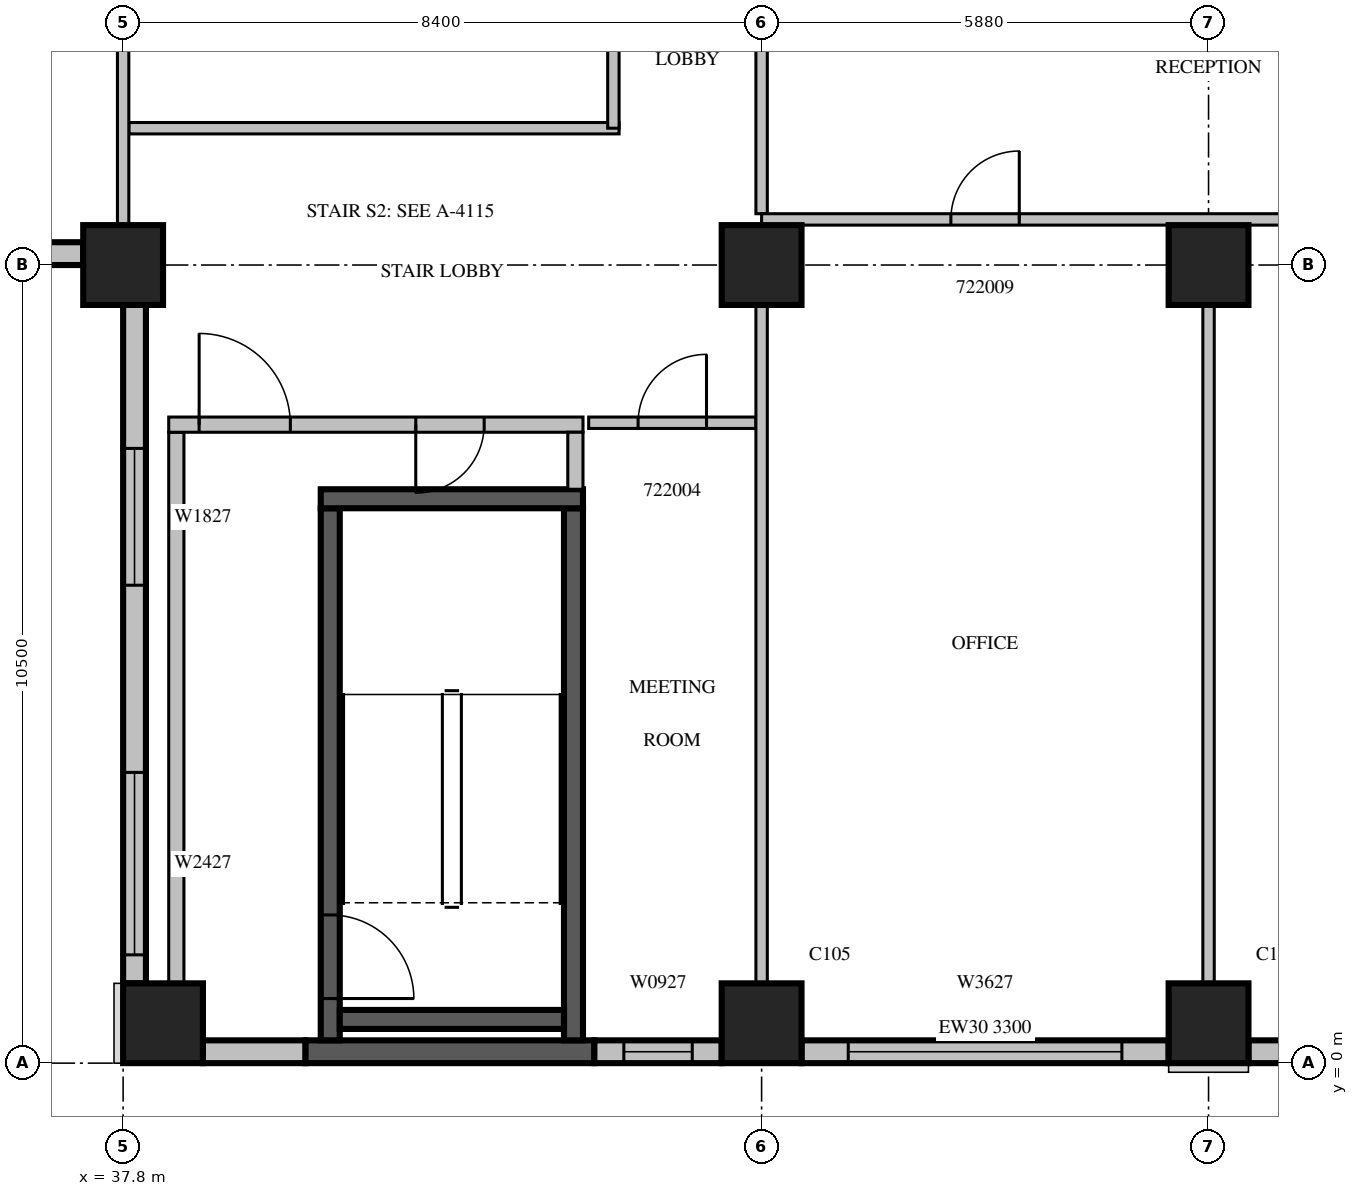
"""IFC4 building model, lengths in metres.
Left out: names, types, materials, properties, quantities, classifications, styles, units other than length and angle.
Written with IfcOpenShell. Run it as: python <this file> out.ifc"""

import sys

from ifc_helpers import new_model, si_unit, direction, frame, frame_2d, origin, origin_2d, place, context, subcontext, project, spatial, rectangle, extrude, source, transform, mapped, element, fill, save


model = new_model("IFC4")
c1 = context("Model", 3, precision=1e-05, world=origin(), true_north=direction((0.0, 1.0)))
c2 = subcontext(c1, "Body", "Model", "MODEL_VIEW")
j1 = project(units=[si_unit("LENGTHUNIT", "METRE"), si_unit("PLANEANGLEUNIT", "RADIAN")], contexts=[c1])
p1 = place(None, origin())
s1 = spatial("IfcSite", under=j1, at=p1, CompositionType="ELEMENT")
p2 = place(p1, origin())
s2 = spatial("IfcBuilding", under=s1, at=p2, CompositionType="ELEMENT")
p3 = place(p2, frame((0.0, 0.0, 103.5)))
s3 = spatial("IfcBuildingStorey", under=s2, at=p3, CompositionType="ELEMENT", Elevation=103.5)
m1 = source(origin(), c2, "Body", "SweptSolid", [
    extrude(rectangle(XDim=1.05, YDim=1.05, at=origin_2d()), origin(), (0.0, 0.0, 1.0), 4.2),
])
for number, where, z_axis, x_axis in (
    (1, (38.325, 0.525, 0.0), (0.0, 0.0, 1.0), (1.0, 0.0, 0.0)),
    (2, (46.2, 0.525, 0.0), (0.0, 0.0, 1.0), (1.0, 0.0, 0.0)),
    (3, (52.08, 0.525, 0.0), (0.0, 0.0, 1.0), (1.0, 0.0, 0.0)),
    (4, (37.8, 10.5, 0.0), (0.0, 0.0, 1.0), (1.0, 0.0, 0.0)),
    (5, (46.2, 10.5, 0.0), (0.0, 0.0, 1.0), (1.0, 0.0, 0.0)),
    (6, (52.08, 10.5, 0.0), (0.0, 0.0, 1.0), (1.0, 0.0, 0.0)),
):
    element("IfcColumn", number, at=place(p3, frame(where, z_axis=z_axis, x_axis=x_axis)), inside=s3, PredefinedType="COLUMN", context=c2, shape_type="MappedRepresentation", body=[
        mapped(m1, transform((0.0, 0.0, 0.0), scale=1.0)),
    ])
m2 = source(origin(), c2, "Body", "SweptSolid", [
    extrude(rectangle(XDim=7.35, YDim=0.3, at=frame_2d((3.675, 0.0))), origin(), (0.0, 0.0, 1.0), 3.8),
])
p4 = place(p3, frame((29.925, 10.65, 0.0), z_axis=(0.0, 0.0, 1.0), x_axis=(1.0, 0.0, 0.0)))
e7 = element("IfcWall", 7, at=p4, inside=s3, PredefinedType="STANDARD", context=c2, shape_type="MappedRepresentation", body=[
    mapped(m2, transform((0.0, 0.0, 0.0), scale=1.0)),
])
m3 = source(origin(), c2, "Body", "SweptSolid", [
    extrude(rectangle(XDim=1.8, YDim=2.7, at=frame_2d((0.9, 1.35))), frame((0.0, 0.16, 0.0), z_axis=(0.0, -1.0, 0.0), x_axis=(1.0, 0.0, 0.0)), (0.0, 0.0, 1.0), 0.32),
])
p5 = place(p4, frame((4.948, 0.0, 0.6)))
e8 = element("IfcOpeningElement", 8, at=p5, cuts=e7, PredefinedType="OPENING", context=c2, shape_type="MappedRepresentation", body=[
    mapped(m3, transform((0.0, 0.0, 0.0), scale=1.0)),
])
m4 = source(origin(), c2, "Body", "SweptSolid", [
    extrude(rectangle(XDim=1.2, YDim=2.7, at=frame_2d((0.6, 1.35))), frame((0.0, 0.16, 0.0), z_axis=(0.0, -1.0, 0.0), x_axis=(1.0, 0.0, 0.0)), (0.0, 0.0, 1.0), 0.32),
])
p6 = place(p4, frame((2.195, 0.0, 0.6)))
e9 = element("IfcOpeningElement", 9, at=p6, cuts=e7, PredefinedType="OPENING", context=c2, shape_type="MappedRepresentation", body=[
    mapped(m4, transform((0.0, 0.0, 0.0), scale=1.0)),
])
m5 = source(origin(), c2, "Body", "SweptSolid", [
    extrude(rectangle(XDim=8.925, YDim=0.3, at=frame_2d((4.463, 0.0))), origin(), (0.0, 0.0, 1.0), 3.8),
])
p7 = place(p3, frame((37.95, 9.975, 0.0), z_axis=(0.0, 0.0, 1.0), x_axis=(0.0, -1.0, 0.0)))
e10 = element("IfcWall", 10, at=p7, inside=s3, PredefinedType="STANDARD", context=c2, shape_type="MappedRepresentation", body=[
    mapped(m5, transform((0.0, 0.0, 0.0), scale=1.0)),
])
p8 = place(p7, frame((1.887, 0.0, 0.6)))
e11 = element("IfcOpeningElement", 11, at=p8, cuts=e10, PredefinedType="OPENING", context=c2, shape_type="MappedRepresentation", body=[
    mapped(m3, transform((0.0, 0.0, 0.0), scale=1.0)),
])
m6 = source(origin(), c2, "Body", "SweptSolid", [
    extrude(rectangle(XDim=2.4, YDim=2.7, at=frame_2d((1.2, 1.35))), frame((0.0, 0.16, 0.0), z_axis=(0.0, -1.0, 0.0), x_axis=(1.0, 0.0, 0.0)), (0.0, 0.0, 1.0), 0.32),
])
p9 = place(p7, frame((6.15, 0.0, 0.6)))
e12 = element("IfcOpeningElement", 12, at=p9, cuts=e10, PredefinedType="OPENING", context=c2, shape_type="MappedRepresentation", body=[
    mapped(m6, transform((0.0, 0.0, 0.0), scale=1.0)),
])
p10 = place(p3, frame((38.85, 0.15, 0.0), z_axis=(0.0, 0.0, 1.0), x_axis=(1.0, 0.0, 0.0)))
e13 = element("IfcWall", 13, at=p10, inside=s3, PredefinedType="STANDARD", context=c2, shape_type="SweptSolid", body=[
    extrude(rectangle(XDim=1.35, YDim=0.3, at=frame_2d((0.675, 0.0))), origin(), (0.0, 0.0, 1.0), 3.8),
])
m7 = source(origin(), c2, "Body", "SweptSolid", [
    extrude(rectangle(XDim=3.8, YDim=0.3, at=frame_2d((1.9, 0.0))), origin(), (0.0, 0.0, 1.0), 3.8),
])
p11 = place(p3, frame((40.2, 0.15, 0.0), z_axis=(0.0, 0.0, 1.0), x_axis=(1.0, 0.0, 0.0)))
e14 = element("IfcWall", 14, at=p11, inside=s3, PredefinedType="SOLIDWALL", context=c2, shape_type="MappedRepresentation", body=[
    mapped(m7, transform((0.0, 0.0, 0.0), scale=1.0)),
])
p12 = place(p3, frame((44.0, 0.15, 0.0), z_axis=(0.0, 0.0, 1.0), x_axis=(1.0, 0.0, 0.0)))
e15 = element("IfcWall", 15, at=p12, inside=s3, PredefinedType="STANDARD", context=c2, shape_type="SweptSolid", body=[
    extrude(rectangle(XDim=1.675, YDim=0.3, at=frame_2d((0.838, 0.0))), origin(), (0.0, 0.0, 1.0), 3.8),
])
m8 = source(origin(), c2, "Body", "SweptSolid", [
    extrude(rectangle(XDim=0.9, YDim=2.7, at=frame_2d((0.45, 1.35))), frame((0.0, 0.16, 0.0), z_axis=(0.0, -1.0, 0.0), x_axis=(1.0, 0.0, 0.0)), (0.0, 0.0, 1.0), 0.32),
])
p13 = place(p12, frame((0.388, 0.0, 0.6)))
e16 = element("IfcOpeningElement", 16, at=p13, cuts=e15, PredefinedType="OPENING", context=c2, shape_type="MappedRepresentation", body=[
    mapped(m8, transform((0.0, 0.0, 0.0), scale=1.0)),
])
p14 = place(p3, frame((46.725, 0.15, 0.0), z_axis=(0.0, 0.0, 1.0), x_axis=(1.0, 0.0, 0.0)))
e17 = element("IfcWall", 17, at=p14, inside=s3, PredefinedType="STANDARD", context=c2, shape_type="SweptSolid", body=[
    extrude(rectangle(XDim=4.83, YDim=0.3, at=frame_2d((2.415, 0.0))), origin(), (0.0, 0.0, 1.0), 3.3),
])
m9 = source(origin(), c2, "Body", "SweptSolid", [
    extrude(rectangle(XDim=3.6, YDim=2.7, at=frame_2d((1.8, 1.35))), frame((0.0, 0.16, 0.0), z_axis=(0.0, -1.0, 0.0), x_axis=(1.0, 0.0, 0.0)), (0.0, 0.0, 1.0), 0.32),
])
p15 = place(p14, frame((0.615, 0.0, 0.6)))
e18 = element("IfcOpeningElement", 18, at=p15, cuts=e17, PredefinedType="OPENING", context=c2, shape_type="MappedRepresentation", body=[
    mapped(m9, transform((0.0, 0.0, 0.0), scale=1.0)),
])
p16 = place(p3, frame((52.605, 0.15, 0.0), z_axis=(0.0, 0.0, 1.0), x_axis=(1.0, 0.0, 0.0)))
e19 = element("IfcWall", 19, at=p16, inside=s3, PredefinedType="STANDARD", context=c2, shape_type="SweptSolid", body=[
    extrude(rectangle(XDim=4.83, YDim=0.3, at=frame_2d((2.415, 0.0))), origin(), (0.0, 0.0, 1.0), 3.8),
])
p17 = place(p16, frame((0.615, 0.0, 0.6)))
e20 = element("IfcOpeningElement", 20, at=p17, cuts=e19, PredefinedType="OPENING", context=c2, shape_type="MappedRepresentation", body=[
    mapped(m9, transform((0.0, 0.0, 0.0), scale=1.0)),
])
m10 = source(origin(), c2, "Body", "SweptSolid", [
    extrude(rectangle(XDim=7.0, YDim=0.25, at=frame_2d((3.5, 0.0))), origin(), (0.0, 0.0, 1.0), 3.8),
])
p18 = place(p3, frame((40.525, 0.3, 0.0), z_axis=(0.0, 0.0, 1.0), x_axis=(0.0, 1.0, 0.0)))
e21 = element("IfcWall", 21, at=p18, inside=s3, PredefinedType="SOLIDWALL", context=c2, shape_type="MappedRepresentation", body=[
    mapped(m10, transform((0.0, 0.0, 0.0), scale=1.0)),
])
m11 = source(origin(), c2, "Body", "SweptSolid", [
    extrude(rectangle(XDim=1.1, YDim=2.1, at=frame_2d((0.55, 1.05))), frame((0.0, 0.135, 0.0), z_axis=(0.0, -1.0, 0.0), x_axis=(1.0, 0.0, 0.0)), (0.0, 0.0, 1.0), 0.27),
])
p19 = place(p18, frame((0.55, 0.0, 0.0)))
e22 = element("IfcOpeningElement", 22, at=p19, cuts=e21, PredefinedType="OPENING", context=c2, shape_type="MappedRepresentation", body=[
    mapped(m11, transform((0.0, 0.0, 0.0), scale=1.0)),
])
p20 = place(p3, frame((43.725, 0.3, 0.0), z_axis=(0.0, 0.0, 1.0), x_axis=(0.0, 1.0, 0.0)))
e23 = element("IfcWall", 23, at=p20, inside=s3, PredefinedType="SOLIDWALL", context=c2, shape_type="MappedRepresentation", body=[
    mapped(m10, transform((0.0, 0.0, 0.0), scale=1.0)),
])
m12 = source(origin(), c2, "Body", "SweptSolid", [
    extrude(rectangle(XDim=3.45, YDim=0.25, at=frame_2d((1.725, 0.0))), origin(), (0.0, 0.0, 1.0), 3.8),
])
p21 = place(p3, frame((40.4, 7.425, 0.0), z_axis=(0.0, 0.0, 1.0), x_axis=(1.0, 0.0, 0.0)))
e24 = element("IfcWall", 24, at=p21, inside=s3, PredefinedType="SOLIDWALL", context=c2, shape_type="MappedRepresentation", body=[
    mapped(m12, transform((0.0, 0.0, 0.0), scale=1.0)),
])
m13 = source(origin(), c2, "Body", "SweptSolid", [
    extrude(rectangle(XDim=2.95, YDim=0.25, at=frame_2d((1.475, 0.0))), origin(), (0.0, 0.0, 1.0), 3.8),
])
p22 = place(p3, frame((40.65, 0.575, 0.0), z_axis=(0.0, 0.0, 1.0), x_axis=(1.0, 0.0, 0.0)))
e25 = element("IfcWall", 25, at=p22, inside=s3, PredefinedType="SOLIDWALL", context=c2, shape_type="MappedRepresentation", body=[
    mapped(m13, transform((0.0, 0.0, 0.0), scale=1.0)),
])
m14 = source(origin(), c2, "Body", "SweptSolid", [
    extrude(rectangle(XDim=8.0, YDim=0.2, at=frame_2d((4.0, 0.0))), origin(), (0.0, 0.0, 1.0), 3.8),
])
p23 = place(p3, frame((38.5, 0.3, 0.0), z_axis=(0.0, 0.0, 1.0), x_axis=(0.0, 1.0, 0.0)))
e26 = element("IfcWall", 26, at=p23, inside=s3, PredefinedType="PARTITIONING", context=c2, shape_type="MappedRepresentation", body=[
    mapped(m14, transform((0.0, 0.0, 0.0), scale=1.0)),
])
m15 = source(origin(), c2, "Body", "SweptSolid", [
    extrude(rectangle(XDim=5.45, YDim=0.2, at=frame_2d((2.725, 0.0))), origin(), (0.0, 0.0, 1.0), 3.8),
])
p24 = place(p3, frame((38.4, 8.4, 0.0), z_axis=(0.0, 0.0, 1.0), x_axis=(1.0, 0.0, 0.0)))
e27 = element("IfcWall", 27, at=p24, inside=s3, PredefinedType="PARTITIONING", context=c2, shape_type="MappedRepresentation", body=[
    mapped(m15, transform((0.0, 0.0, 0.0), scale=1.0)),
])
m16 = source(origin(), c2, "Body", "SweptSolid", [
    extrude(rectangle(XDim=1.2, YDim=2.1, at=frame_2d((0.6, 1.05))), frame((0.0, 0.11, 0.0), z_axis=(0.0, -1.0, 0.0), x_axis=(1.0, 0.0, 0.0)), (0.0, 0.0, 1.0), 0.22),
])
p25 = place(p24, frame((0.4, 0.0, 0.0)))
e28 = element("IfcOpeningElement", 28, at=p25, cuts=e27, PredefinedType="OPENING", context=c2, shape_type="MappedRepresentation", body=[
    mapped(m16, transform((0.0, 0.0, 0.0), scale=1.0)),
])
m17 = source(origin(), c2, "Body", "SweptSolid", [
    extrude(rectangle(XDim=0.9, YDim=2.1, at=frame_2d((0.45, 1.05))), frame((0.0, 0.11, 0.0), z_axis=(0.0, -1.0, 0.0), x_axis=(1.0, 0.0, 0.0)), (0.0, 0.0, 1.0), 0.22),
])
p26 = place(p24, frame((3.25, 0.0, 0.0)))
e29 = element("IfcOpeningElement", 29, at=p26, cuts=e27, PredefinedType="OPENING", context=c2, shape_type="MappedRepresentation", body=[
    mapped(m17, transform((0.0, 0.0, 0.0), scale=1.0)),
])
m18 = source(origin(), c2, "Body", "SweptSolid", [
    extrude(rectangle(XDim=0.75, YDim=0.2, at=frame_2d((0.375, 0.0))), origin(), (0.0, 0.0, 1.0), 3.8),
])
p27 = place(p3, frame((43.75, 7.55, 0.0), z_axis=(0.0, 0.0, 1.0), x_axis=(0.0, 1.0, 0.0)))
e30 = element("IfcWall", 30, at=p27, inside=s3, PredefinedType="PARTITIONING", context=c2, shape_type="MappedRepresentation", body=[
    mapped(m18, transform((0.0, 0.0, 0.0), scale=1.0)),
])
m19 = source(origin(), c2, "Body", "SweptSolid", [
    extrude(rectangle(XDim=6.45, YDim=0.15, at=frame_2d((3.225, 0.0))), origin(), (0.0, 0.0, 1.0), 3.8),
])
p28 = place(p3, frame((37.875, 12.3, 0.0), z_axis=(0.0, 0.0, 1.0), x_axis=(1.0, 0.0, 0.0)))
e31 = element("IfcWall", 31, at=p28, inside=s3, PredefinedType="PARTITIONING", context=c2, shape_type="MappedRepresentation", body=[
    mapped(m19, transform((0.0, 0.0, 0.0), scale=1.0)),
])
m20 = source(origin(), c2, "Body", "SweptSolid", [
    extrude(rectangle(XDim=2.775, YDim=0.15, at=frame_2d((1.387, 0.0))), origin(), (0.0, 0.0, 1.0), 3.8),
])
p29 = place(p3, frame((44.25, 12.3, 0.0), z_axis=(0.0, 0.0, 1.0), x_axis=(0.0, 1.0, 0.0)))
e32 = element("IfcWall", 32, at=p29, inside=s3, PredefinedType="PARTITIONING", context=c2, shape_type="MappedRepresentation", body=[
    mapped(m20, transform((0.0, 0.0, 0.0), scale=1.0)),
])
m21 = source(origin(), c2, "Body", "SweptSolid", [
    extrude(rectangle(XDim=2.2, YDim=0.15, at=frame_2d((1.1, 0.0))), origin(), (0.0, 0.0, 1.0), 3.8),
])
p30 = place(p3, frame((46.125, 8.425, 0.0), z_axis=(0.0, 0.0, 1.0), x_axis=(-1.0, 0.0, 0.0)))
e33 = element("IfcWall", 33, at=p30, inside=s3, PredefinedType="PARTITIONING", context=c2, shape_type="MappedRepresentation", body=[
    mapped(m21, transform((0.0, 0.0, 0.0), scale=1.0)),
])
m22 = source(origin(), c2, "Body", "SweptSolid", [
    extrude(rectangle(XDim=0.9, YDim=2.1, at=frame_2d((0.45, 1.05))), frame((0.0, 0.085, 0.0), z_axis=(0.0, -1.0, 0.0), x_axis=(1.0, 0.0, 0.0)), (0.0, 0.0, 1.0), 0.17),
])
p31 = place(p30, frame((0.65, 0.0, 0.0)))
e34 = element("IfcOpeningElement", 34, at=p31, cuts=e33, PredefinedType="OPENING", context=c2, shape_type="MappedRepresentation", body=[
    mapped(m22, transform((0.0, 0.0, 0.0), scale=1.0)),
])
m23 = source(origin(), c2, "Body", "SweptSolid", [
    extrude(rectangle(XDim=3.976, YDim=0.15, at=frame_2d((1.988, 0.0))), origin(), (0.0, 0.0, 1.0), 3.8),
])
p32 = place(p3, frame((37.8, 11.024, 0.0), z_axis=(0.0, 0.0, 1.0), x_axis=(0.0, 1.0, 0.0)))
e35 = element("IfcWall", 35, at=p32, inside=s3, PredefinedType="PARTITIONING", context=c2, shape_type="MappedRepresentation", body=[
    mapped(m23, transform((0.0, 0.0, 0.0), scale=1.0)),
])
p33 = place(p3, frame((52.08, 1.049, 0.0), z_axis=(0.0, 0.0, 1.0), x_axis=(0.0, 1.0, 0.0)))
e36 = element("IfcWall", 36, at=p33, inside=s3, PredefinedType="PARTITIONING", context=c2, shape_type="SweptSolid", body=[
    extrude(rectangle(XDim=8.927, YDim=0.15, at=frame_2d((4.463, 0.0))), origin(), (0.0, 0.0, 1.0), 3.8),
])
m24 = source(origin(), c2, "Body", "SweptSolid", [
    extrude(rectangle(XDim=8.927, YDim=0.15, at=frame_2d((4.463, 0.0))), origin(), (0.0, 0.0, 1.0), 3.8),
])
p34 = place(p3, frame((46.2, 1.049, 0.0), z_axis=(0.0, 0.0, 1.0), x_axis=(0.0, 1.0, 0.0)))
e37 = element("IfcWall", 37, at=p34, inside=s3, PredefinedType="PARTITIONING", context=c2, shape_type="MappedRepresentation", body=[
    mapped(m24, transform((0.0, 0.0, 0.0), scale=1.0)),
])
m25 = source(origin(), c2, "Body", "SweptSolid", [
    extrude(rectangle(XDim=3.825, YDim=0.15, at=frame_2d((1.913, 0.0))), origin(), (0.0, 0.0, 1.0), 3.8),
])
p35 = place(p3, frame((46.2, 11.175, 0.0), z_axis=(0.0, 0.0, 1.0), x_axis=(0.0, 1.0, 0.0)))
e38 = element("IfcWall", 38, at=p35, inside=s3, PredefinedType="PARTITIONING", context=c2, shape_type="MappedRepresentation", body=[
    mapped(m25, transform((0.0, 0.0, 0.0), scale=1.0)),
])
m26 = source(origin(), c2, "Body", "SweptSolid", [
    extrude(rectangle(XDim=24.9, YDim=0.15, at=frame_2d((12.45, 0.0))), origin(), (0.0, 0.0, 1.0), 3.8),
])
p36 = place(p3, frame((71.1, 11.1, 0.0), z_axis=(0.0, 0.0, 1.0), x_axis=(-1.0, 0.0, 0.0)))
e39 = element("IfcWall", 39, at=p36, inside=s3, PredefinedType="PARTITIONING", context=c2, shape_type="MappedRepresentation", body=[
    mapped(m26, transform((0.0, 0.0, 0.0), scale=1.0)),
])
p37 = place(p36, frame((21.51, 0.0, 0.0)))
e40 = element("IfcOpeningElement", 40, at=p37, cuts=e39, PredefinedType="OPENING", context=c2, shape_type="MappedRepresentation", body=[
    mapped(m22, transform((0.0, 0.0, 0.0), scale=1.0)),
])
p38 = place(p36, frame((15.63, 0.0, 0.0)))
e41 = element("IfcOpeningElement", 41, at=p38, cuts=e39, PredefinedType="OPENING", context=c2, shape_type="MappedRepresentation", body=[
    mapped(m22, transform((0.0, 0.0, 0.0), scale=1.0)),
])
m27 = source(origin(), c2, "Body", "SweptSolid", [
    extrude(rectangle(XDim=1.1, YDim=2.1, at=frame_2d((0.55, 1.05))), frame((0.0, 0.085, 0.0), z_axis=(0.0, -1.0, 0.0), x_axis=(1.0, 0.0, 0.0)), (0.0, 0.0, 1.0), 0.17),
])
p39 = place(p36, frame((10.692, 0.0, 0.0)))
e42 = element("IfcOpeningElement", 42, at=p39, cuts=e39, PredefinedType="OPENING", context=c2, shape_type="MappedRepresentation", body=[
    mapped(m27, transform((0.0, 0.0, 0.0), scale=1.0)),
])
m28 = source(origin(), c2, "Body", "SweptSolid", [
    extrude(rectangle(XDim=1.8, YDim=2.7, at=frame_2d((0.9, 1.35))), frame((0.0, 0.03, 0.0), z_axis=(0.0, -1.0, 0.0), x_axis=(1.0, 0.0, 0.0)), (0.0, 0.0, 1.0), 0.06),
])
p40 = place(p8, origin())
e43 = element("IfcWindow", 43, at=p40, inside=s3, PartitioningType="SINGLE_PANEL", PredefinedType="WINDOW", context=c2, shape_type="MappedRepresentation", body=[
    mapped(m28, transform((0.0, 0.0, 0.0), scale=1.0)),
])
fill(e11, e43)
m29 = source(origin(), c2, "Body", "SweptSolid", [
    extrude(rectangle(XDim=2.4, YDim=2.7, at=frame_2d((1.2, 1.35))), frame((0.0, 0.03, 0.0), z_axis=(0.0, -1.0, 0.0), x_axis=(1.0, 0.0, 0.0)), (0.0, 0.0, 1.0), 0.06),
])
p41 = place(p9, origin())
e44 = element("IfcWindow", 44, at=p41, inside=s3, PartitioningType="SINGLE_PANEL", PredefinedType="WINDOW", context=c2, shape_type="MappedRepresentation", body=[
    mapped(m29, transform((0.0, 0.0, 0.0), scale=1.0)),
])
fill(e12, e44)
m30 = source(origin(), c2, "Body", "SweptSolid", [
    extrude(rectangle(XDim=0.9, YDim=2.7, at=frame_2d((0.45, 1.35))), frame((0.0, 0.03, 0.0), z_axis=(0.0, -1.0, 0.0), x_axis=(1.0, 0.0, 0.0)), (0.0, 0.0, 1.0), 0.06),
])
p42 = place(p13, origin())
e45 = element("IfcWindow", 45, at=p42, inside=s3, PartitioningType="SINGLE_PANEL", PredefinedType="WINDOW", context=c2, shape_type="MappedRepresentation", body=[
    mapped(m30, transform((0.0, 0.0, 0.0), scale=1.0)),
])
fill(e16, e45)
m31 = source(origin(), c2, "Body", "SweptSolid", [
    extrude(rectangle(XDim=3.6, YDim=2.7, at=frame_2d((1.8, 1.35))), frame((0.0, 0.03, 0.0), z_axis=(0.0, -1.0, 0.0), x_axis=(1.0, 0.0, 0.0)), (0.0, 0.0, 1.0), 0.06),
])
p43 = place(p15, origin())
e46 = element("IfcWindow", 46, at=p43, inside=s3, PartitioningType="SINGLE_PANEL", PredefinedType="WINDOW", context=c2, shape_type="MappedRepresentation", body=[
    mapped(m31, transform((0.0, 0.0, 0.0), scale=1.0)),
])
fill(e18, e46)
m32 = source(origin(), c2, "Body", "SweptSolid", [
    extrude(rectangle(XDim=1.1, YDim=2.1, at=frame_2d((0.55, 1.05))), frame((0.0, 0.025, 0.0), z_axis=(0.0, -1.0, 0.0), x_axis=(1.0, 0.0, 0.0)), (0.0, 0.0, 1.0), 0.05),
])
p44 = place(p19, origin())
e47 = element("IfcDoor", 47, at=p44, inside=s3, OperationType="SINGLE_SWING_RIGHT", PredefinedType="DOOR", context=c2, shape_type="MappedRepresentation", body=[
    mapped(m32, transform((0.0, 0.0, 0.0), scale=1.0)),
])
fill(e22, e47)
m33 = source(origin(), c2, "Body", "SweptSolid", [
    extrude(rectangle(XDim=1.2, YDim=2.1, at=frame_2d((0.6, 1.05))), frame((0.0, 0.025, 0.0), z_axis=(0.0, -1.0, 0.0), x_axis=(1.0, 0.0, 0.0)), (0.0, 0.0, 1.0), 0.05),
])
p45 = place(p25, origin())
e48 = element("IfcDoor", 48, at=p45, inside=s3, OperationType="SINGLE_SWING_LEFT", PredefinedType="DOOR", context=c2, shape_type="MappedRepresentation", body=[
    mapped(m33, transform((0.0, 0.0, 0.0), scale=1.0)),
])
fill(e28, e48)
m34 = source(origin(), c2, "Body", "SweptSolid", [
    extrude(rectangle(XDim=0.9, YDim=2.1, at=frame_2d((0.45, 1.05))), frame((0.0, 0.025, 0.0), z_axis=(0.0, -1.0, 0.0), x_axis=(1.0, 0.0, 0.0)), (0.0, 0.0, 1.0), 0.05),
])
p46 = place(p26, origin())
e49 = element("IfcDoor", 49, at=p46, inside=s3, OperationType="SINGLE_SWING_RIGHT", PredefinedType="DOOR", context=c2, shape_type="MappedRepresentation", body=[
    mapped(m34, transform((0.0, 0.0, 0.0), scale=1.0)),
])
fill(e29, e49)
p47 = place(p31, origin())
e50 = element("IfcDoor", 50, at=p47, inside=s3, OperationType="SINGLE_SWING_RIGHT", PredefinedType="DOOR", context=c2, shape_type="MappedRepresentation", body=[
    mapped(m34, transform((0.0, 0.0, 0.0), scale=1.0)),
])
fill(e34, e50)
p48 = place(p37, origin())
e51 = element("IfcDoor", 51, at=p48, inside=s3, OperationType="SINGLE_SWING_RIGHT", PredefinedType="DOOR", context=c2, shape_type="MappedRepresentation", body=[
    mapped(m34, transform((0.0, 0.0, 0.0), scale=1.0)),
])
fill(e40, e51)
save(model, sys.argv[1])
